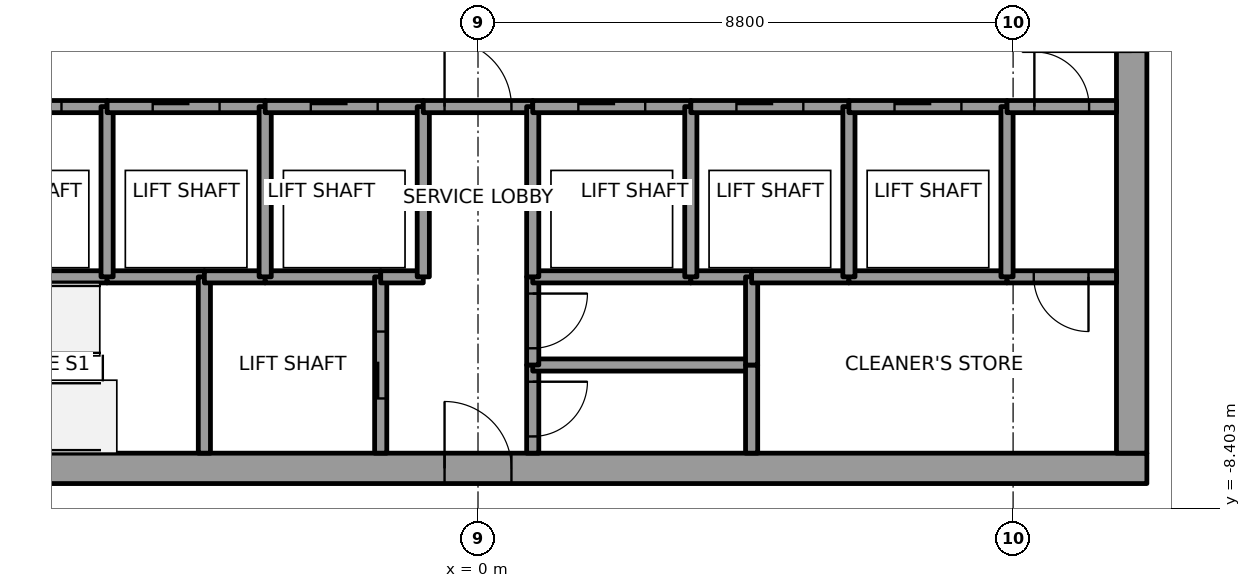
"""IFC4 building model, lengths in metres.
Left out: names, types, materials, properties, quantities, classifications, styles, units other than length and angle.
Written with IfcOpenShell. Run it as: python <this file> out.ifc"""

import sys

from ifc_helpers import new_model, si_unit, direction, frame, frame_2d, origin, place, context, subcontext, project, spatial, rectangle, extrude, element, fill, save


model = new_model("IFC4")
c1 = context("Model", 3, precision=1e-05, world=origin(), true_north=direction((0.0, 1.0)))
c2 = subcontext(c1, "Body", "Model", "MODEL_VIEW")
j1 = project(units=[si_unit("LENGTHUNIT", "METRE"), si_unit("PLANEANGLEUNIT", "RADIAN")], contexts=[c1])
p1 = place(None, origin())
s1 = spatial("IfcSite", under=j1, at=p1, CompositionType="ELEMENT")
p2 = place(p1, origin())
s2 = spatial("IfcBuilding", under=s1, at=p2, CompositionType="ELEMENT")
p3 = place(p2, frame((0.0, 0.0, 307.0)))
s3 = spatial("IfcBuildingStorey", under=s2, at=p3, CompositionType="ELEMENT", Elevation=307.0)
p4 = place(p3, frame((-11.0, -7.75, 0.0), z_axis=(0.0, 0.0, 1.0), x_axis=(1.0, 0.0, 0.0)))
e1 = element("IfcWall", 1, at=p4, inside=s3, PredefinedType="SHEAR", context=c2, shape_type="SweptSolid", body=[
    extrude(rectangle(XDim=22.0, YDim=0.5, at=frame_2d((11.0, 0.0))), origin(), (0.0, 0.0, 1.0), 4.0),
])
p5 = place(p4, frame((10.45, 0.0, 0.0)))
e2 = element("IfcOpeningElement", 2, at=p5, cuts=e1, PredefinedType="OPENING", context=c2, shape_type="SweptSolid", body=[
    extrude(rectangle(XDim=1.1, YDim=2.1, at=frame_2d((0.55, 1.05))), frame((0.0, 0.25, 0.0), z_axis=(0.0, -1.0, 0.0), x_axis=(1.0, 0.0, 0.0)), (0.0, 0.0, 1.0), 0.5),
])
p6 = place(p3, frame((10.75, -7.5, 0.0), z_axis=(0.0, 0.0, 1.0), x_axis=(0.0, 1.0, 0.0)))
e3 = element("IfcWall", 3, at=p6, inside=s3, PredefinedType="SHEAR", context=c2, shape_type="SweptSolid", body=[
    extrude(rectangle(XDim=15.0, YDim=0.5, at=frame_2d((7.5, 0.0))), origin(), (0.0, 0.0, 1.0), 4.0),
])
p7 = place(p6, frame((6.6, 0.0, 0.0)))
e4 = element("IfcOpeningElement", 4, at=p7, cuts=e3, PredefinedType="OPENING", context=c2, shape_type="SweptSolid", body=[
    extrude(rectangle(XDim=1.8, YDim=2.1, at=frame_2d((0.9, 1.05))), frame((0.0, 0.25, 0.0), z_axis=(0.0, -1.0, 0.0), x_axis=(1.0, 0.0, 0.0)), (0.0, 0.0, 1.0), 0.5),
])
p8 = place(p3, frame((-8.7, -4.6, 0.0), z_axis=(0.0, 0.0, 1.0), x_axis=(1.0, 0.0, 0.0)))
e5 = element("IfcWall", 5, at=p8, inside=s3, PredefinedType="SOLIDWALL", context=c2, shape_type="SweptSolid", body=[
    extrude(rectangle(XDim=2.6, YDim=0.2, at=frame_2d((1.3, 0.0))), origin(), (0.0, 0.0, 1.0), 3.85),
])
p9 = place(p3, frame((-8.7, -1.8, 0.0), z_axis=(0.0, 0.0, 1.0), x_axis=(1.0, 0.0, 0.0)))
e6 = element("IfcWall", 6, at=p9, inside=s3, PredefinedType="SOLIDWALL", context=c2, shape_type="SweptSolid", body=[
    extrude(rectangle(XDim=2.6, YDim=0.2, at=frame_2d((1.3, 0.0))), origin(), (0.0, 0.0, 1.0), 3.85),
])
p10 = place(p9, frame((0.75, 0.0, 0.0)))
e7 = element("IfcOpeningElement", 7, at=p10, cuts=e6, PredefinedType="OPENING", context=c2, shape_type="SweptSolid", body=[
    extrude(rectangle(XDim=1.1, YDim=2.1, at=frame_2d((0.55, 1.05))), frame((0.0, 0.1, 0.0), z_axis=(0.0, -1.0, 0.0), x_axis=(1.0, 0.0, 0.0)), (0.0, 0.0, 1.0), 0.2),
])
p11 = place(p3, frame((-6.1, -4.6, 0.0), z_axis=(0.0, 0.0, 1.0), x_axis=(1.0, 0.0, 0.0)))
e8 = element("IfcWall", 8, at=p11, inside=s3, PredefinedType="SOLIDWALL", context=c2, shape_type="SweptSolid", body=[
    extrude(rectangle(XDim=1.6, YDim=0.2, at=frame_2d((0.8, 0.0))), origin(), (0.0, 0.0, 1.0), 3.85),
])
p12 = place(p3, frame((-6.1, -4.6, 0.0), z_axis=(0.0, 0.0, 1.0), x_axis=(0.0, 1.0, 0.0)))
e9 = element("IfcWall", 9, at=p12, inside=s3, PredefinedType="SOLIDWALL", context=c2, shape_type="SweptSolid", body=[
    extrude(rectangle(XDim=2.8, YDim=0.2, at=frame_2d((1.4, 0.0))), origin(), (0.0, 0.0, 1.0), 3.85),
])
p13 = place(p3, frame((-6.1, -1.8, 0.0), z_axis=(0.0, 0.0, 1.0), x_axis=(1.0, 0.0, 0.0)))
e10 = element("IfcWall", 10, at=p13, inside=s3, PredefinedType="SOLIDWALL", context=c2, shape_type="SweptSolid", body=[
    extrude(rectangle(XDim=2.6, YDim=0.2, at=frame_2d((1.3, 0.0))), origin(), (0.0, 0.0, 1.0), 3.85),
])
p14 = place(p13, frame((0.75, 0.0, 0.0)))
e11 = element("IfcOpeningElement", 11, at=p14, cuts=e10, PredefinedType="OPENING", context=c2, shape_type="SweptSolid", body=[
    extrude(rectangle(XDim=1.1, YDim=2.1, at=frame_2d((0.55, 1.05))), frame((0.0, 0.1, 0.0), z_axis=(0.0, -1.0, 0.0), x_axis=(1.0, 0.0, 0.0)), (0.0, 0.0, 1.0), 0.2),
])
p15 = place(p3, frame((-4.5, -4.6, 0.0), z_axis=(0.0, 0.0, 1.0), x_axis=(0.0, -1.0, 0.0)))
e12 = element("IfcWall", 12, at=p15, inside=s3, PredefinedType="SOLIDWALL", context=c2, shape_type="SweptSolid", body=[
    extrude(rectangle(XDim=2.9, YDim=0.2, at=frame_2d((1.45, 0.0))), origin(), (0.0, 0.0, 1.0), 3.85),
])
p16 = place(p3, frame((-4.5, -4.6, 0.0), z_axis=(0.0, 0.0, 1.0), x_axis=(1.0, 0.0, 0.0)))
e13 = element("IfcWall", 13, at=p16, inside=s3, PredefinedType="SOLIDWALL", context=c2, shape_type="SweptSolid", body=[
    extrude(rectangle(XDim=1.0, YDim=0.2, at=frame_2d((0.5, 0.0))), origin(), (0.0, 0.0, 1.0), 3.85),
])
p17 = place(p3, frame((-3.5, -4.6, 0.0), z_axis=(0.0, 0.0, 1.0), x_axis=(1.0, 0.0, 0.0)))
e14 = element("IfcWall", 14, at=p17, inside=s3, PredefinedType="SOLIDWALL", context=c2, shape_type="SweptSolid", body=[
    extrude(rectangle(XDim=1.9, YDim=0.2, at=frame_2d((0.95, 0.0))), origin(), (0.0, 0.0, 1.0), 3.85),
])
p18 = place(p3, frame((-3.5, -4.6, 0.0), z_axis=(0.0, 0.0, 1.0), x_axis=(0.0, 1.0, 0.0)))
e15 = element("IfcWall", 15, at=p18, inside=s3, PredefinedType="SOLIDWALL", context=c2, shape_type="SweptSolid", body=[
    extrude(rectangle(XDim=2.8, YDim=0.2, at=frame_2d((1.4, 0.0))), origin(), (0.0, 0.0, 1.0), 3.85),
])
p19 = place(p3, frame((-3.5, -1.8, 0.0), z_axis=(0.0, 0.0, 1.0), x_axis=(1.0, 0.0, 0.0)))
e16 = element("IfcWall", 16, at=p19, inside=s3, PredefinedType="SOLIDWALL", context=c2, shape_type="SweptSolid", body=[
    extrude(rectangle(XDim=2.6, YDim=0.2, at=frame_2d((1.3, 0.0))), origin(), (0.0, 0.0, 1.0), 3.85),
])
p20 = place(p19, frame((0.75, 0.0, 0.0)))
e17 = element("IfcOpeningElement", 17, at=p20, cuts=e16, PredefinedType="OPENING", context=c2, shape_type="SweptSolid", body=[
    extrude(rectangle(XDim=1.1, YDim=2.1, at=frame_2d((0.55, 1.05))), frame((0.0, 0.1, 0.0), z_axis=(0.0, -1.0, 0.0), x_axis=(1.0, 0.0, 0.0)), (0.0, 0.0, 1.0), 0.2),
])
p21 = place(p3, frame((-1.6, -7.5, 0.0), z_axis=(0.0, 0.0, 1.0), x_axis=(0.0, 1.0, 0.0)))
e18 = element("IfcWall", 18, at=p21, inside=s3, PredefinedType="SOLIDWALL", context=c2, shape_type="SweptSolid", body=[
    extrude(rectangle(XDim=2.9, YDim=0.2, at=frame_2d((1.45, 0.0))), origin(), (0.0, 0.0, 1.0), 3.85),
])
p22 = place(p21, frame((0.9, 0.0, 0.0)))
e19 = element("IfcOpeningElement", 19, at=p22, cuts=e18, PredefinedType="OPENING", context=c2, shape_type="SweptSolid", body=[
    extrude(rectangle(XDim=1.1, YDim=2.1, at=frame_2d((0.55, 1.05))), frame((0.0, 0.1, 0.0), z_axis=(0.0, -1.0, 0.0), x_axis=(1.0, 0.0, 0.0)), (0.0, 0.0, 1.0), 0.2),
])
p23 = place(p3, frame((-1.6, -4.6, 0.0), z_axis=(0.0, 0.0, 1.0), x_axis=(1.0, 0.0, 0.0)))
e20 = element("IfcWall", 20, at=p23, inside=s3, PredefinedType="SOLIDWALL", context=c2, shape_type="SweptSolid", body=[
    extrude(rectangle(XDim=0.7, YDim=0.2, at=frame_2d((0.35, 0.0))), origin(), (0.0, 0.0, 1.0), 3.85),
])
p24 = place(p3, frame((-0.9, -4.6, 0.0), z_axis=(0.0, 0.0, 1.0), x_axis=(0.0, 1.0, 0.0)))
e21 = element("IfcWall", 21, at=p24, inside=s3, PredefinedType="SOLIDWALL", context=c2, shape_type="SweptSolid", body=[
    extrude(rectangle(XDim=2.8, YDim=0.2, at=frame_2d((1.4, 0.0))), origin(), (0.0, 0.0, 1.0), 3.85),
])
p25 = place(p3, frame((-0.9, -1.8, 0.0), z_axis=(0.0, 0.0, 1.0), x_axis=(1.0, 0.0, 0.0)))
e22 = element("IfcWall", 22, at=p25, inside=s3, PredefinedType="SOLIDWALL", context=c2, shape_type="SweptSolid", body=[
    extrude(rectangle(XDim=1.8, YDim=0.2, at=frame_2d((0.9, 0.0))), origin(), (0.0, 0.0, 1.0), 3.85),
])
p26 = place(p25, frame((0.35, 0.0, 0.0)))
e23 = element("IfcOpeningElement", 23, at=p26, cuts=e22, PredefinedType="OPENING", context=c2, shape_type="SweptSolid", body=[
    extrude(rectangle(XDim=1.1, YDim=2.1, at=frame_2d((0.55, 1.05))), frame((0.0, 0.1, 0.0), z_axis=(0.0, -1.0, 0.0), x_axis=(1.0, 0.0, 0.0)), (0.0, 0.0, 1.0), 0.2),
])
p27 = place(p3, frame((0.9, -6.05, 0.0), z_axis=(0.0, 0.0, 1.0), x_axis=(0.0, -1.0, 0.0)))
e24 = element("IfcWall", 24, at=p27, inside=s3, PredefinedType="SOLIDWALL", context=c2, shape_type="SweptSolid", body=[
    extrude(rectangle(XDim=1.45, YDim=0.2, at=frame_2d((0.725, 0.0))), origin(), (0.0, 0.0, 1.0), 3.85),
])
p28 = place(p27, frame((0.275, 0.0, 0.0)))
e25 = element("IfcOpeningElement", 25, at=p28, cuts=e24, PredefinedType="OPENING", context=c2, shape_type="SweptSolid", body=[
    extrude(rectangle(XDim=0.9, YDim=2.1, at=frame_2d((0.45, 1.05))), frame((0.0, 0.1, 0.0), z_axis=(0.0, -1.0, 0.0), x_axis=(1.0, 0.0, 0.0)), (0.0, 0.0, 1.0), 0.2),
])
p29 = place(p3, frame((4.5, -6.05, 0.0), z_axis=(0.0, 0.0, 1.0), x_axis=(-1.0, 0.0, 0.0)))
e26 = element("IfcWall", 26, at=p29, inside=s3, PredefinedType="SOLIDWALL", context=c2, shape_type="SweptSolid", body=[
    extrude(rectangle(XDim=3.6, YDim=0.2, at=frame_2d((1.8, 0.0))), origin(), (0.0, 0.0, 1.0), 3.85),
])
p30 = place(p3, frame((0.9, -4.6, 0.0), z_axis=(0.0, 0.0, 1.0), x_axis=(0.0, -1.0, 0.0)))
e27 = element("IfcWall", 27, at=p30, inside=s3, PredefinedType="SOLIDWALL", context=c2, shape_type="SweptSolid", body=[
    extrude(rectangle(XDim=1.45, YDim=0.2, at=frame_2d((0.725, 0.0))), origin(), (0.0, 0.0, 1.0), 3.85),
])
p31 = place(p30, frame((0.275, 0.0, 0.0)))
e28 = element("IfcOpeningElement", 28, at=p31, cuts=e27, PredefinedType="OPENING", context=c2, shape_type="SweptSolid", body=[
    extrude(rectangle(XDim=0.9, YDim=2.1, at=frame_2d((0.45, 1.05))), frame((0.0, 0.1, 0.0), z_axis=(0.0, -1.0, 0.0), x_axis=(1.0, 0.0, 0.0)), (0.0, 0.0, 1.0), 0.2),
])
p32 = place(p3, frame((3.5, -4.6, 0.0), z_axis=(0.0, 0.0, 1.0), x_axis=(-1.0, 0.0, 0.0)))
e29 = element("IfcWall", 29, at=p32, inside=s3, PredefinedType="SOLIDWALL", context=c2, shape_type="SweptSolid", body=[
    extrude(rectangle(XDim=2.6, YDim=0.2, at=frame_2d((1.3, 0.0))), origin(), (0.0, 0.0, 1.0), 3.85),
])
p33 = place(p3, frame((0.9, -1.8, 0.0), z_axis=(0.0, 0.0, 1.0), x_axis=(0.0, -1.0, 0.0)))
e30 = element("IfcWall", 30, at=p33, inside=s3, PredefinedType="SOLIDWALL", context=c2, shape_type="SweptSolid", body=[
    extrude(rectangle(XDim=2.8, YDim=0.2, at=frame_2d((1.4, 0.0))), origin(), (0.0, 0.0, 1.0), 3.85),
])
p34 = place(p3, frame((0.9, -1.8, 0.0), z_axis=(0.0, 0.0, 1.0), x_axis=(1.0, 0.0, 0.0)))
e31 = element("IfcWall", 31, at=p34, inside=s3, PredefinedType="SOLIDWALL", context=c2, shape_type="SweptSolid", body=[
    extrude(rectangle(XDim=2.6, YDim=0.2, at=frame_2d((1.3, 0.0))), origin(), (0.0, 0.0, 1.0), 3.85),
])
p35 = place(p34, frame((0.75, 0.0, 0.0)))
e32 = element("IfcOpeningElement", 32, at=p35, cuts=e31, PredefinedType="OPENING", context=c2, shape_type="SweptSolid", body=[
    extrude(rectangle(XDim=1.1, YDim=2.1, at=frame_2d((0.55, 1.05))), frame((0.0, 0.1, 0.0), z_axis=(0.0, -1.0, 0.0), x_axis=(1.0, 0.0, 0.0)), (0.0, 0.0, 1.0), 0.2),
])
p36 = place(p3, frame((4.5, -4.6, 0.0), z_axis=(0.0, 0.0, 1.0), x_axis=(-1.0, 0.0, 0.0)))
e33 = element("IfcWall", 33, at=p36, inside=s3, PredefinedType="SOLIDWALL", context=c2, shape_type="SweptSolid", body=[
    extrude(rectangle(XDim=1.0, YDim=0.2, at=frame_2d((0.5, 0.0))), origin(), (0.0, 0.0, 1.0), 3.85),
])
p37 = place(p3, frame((3.5, -4.6, 0.0), z_axis=(0.0, 0.0, 1.0), x_axis=(0.0, 1.0, 0.0)))
e34 = element("IfcWall", 34, at=p37, inside=s3, PredefinedType="SOLIDWALL", context=c2, shape_type="SweptSolid", body=[
    extrude(rectangle(XDim=2.8, YDim=0.2, at=frame_2d((1.4, 0.0))), origin(), (0.0, 0.0, 1.0), 3.85),
])
p38 = place(p3, frame((3.5, -1.8, 0.0), z_axis=(0.0, 0.0, 1.0), x_axis=(1.0, 0.0, 0.0)))
e35 = element("IfcWall", 35, at=p38, inside=s3, PredefinedType="SOLIDWALL", context=c2, shape_type="SweptSolid", body=[
    extrude(rectangle(XDim=2.6, YDim=0.2, at=frame_2d((1.3, 0.0))), origin(), (0.0, 0.0, 1.0), 3.85),
])
p39 = place(p38, frame((0.75, 0.0, 0.0)))
e36 = element("IfcOpeningElement", 36, at=p39, cuts=e35, PredefinedType="OPENING", context=c2, shape_type="SweptSolid", body=[
    extrude(rectangle(XDim=1.1, YDim=2.1, at=frame_2d((0.55, 1.05))), frame((0.0, 0.1, 0.0), z_axis=(0.0, -1.0, 0.0), x_axis=(1.0, 0.0, 0.0)), (0.0, 0.0, 1.0), 0.2),
])
for number, where, z_axis, x_axis in (
    (37, (4.5, -6.05, 0.0), (0.0, 0.0, 1.0), (0.0, -1.0, 0.0)),
    (38, (4.5, -4.6, 0.0), (0.0, 0.0, 1.0), (0.0, -1.0, 0.0)),
):
    element("IfcWall", number, at=place(p3, frame(where, z_axis=z_axis, x_axis=x_axis)), inside=s3, PredefinedType="SOLIDWALL", context=c2, shape_type="SweptSolid", body=[
        extrude(rectangle(XDim=1.45, YDim=0.2, at=frame_2d((0.725, 0.0))), origin(), (0.0, 0.0, 1.0), 3.85),
    ])
p40 = place(p3, frame((6.1, -4.6, 0.0), z_axis=(0.0, 0.0, 1.0), x_axis=(-1.0, 0.0, 0.0)))
e39 = element("IfcWall", 39, at=p40, inside=s3, PredefinedType="SOLIDWALL", context=c2, shape_type="SweptSolid", body=[
    extrude(rectangle(XDim=1.6, YDim=0.2, at=frame_2d((0.8, 0.0))), origin(), (0.0, 0.0, 1.0), 3.85),
])
p41 = place(p3, frame((8.7, -4.6, 0.0), z_axis=(0.0, 0.0, 1.0), x_axis=(-1.0, 0.0, 0.0)))
e40 = element("IfcWall", 40, at=p41, inside=s3, PredefinedType="SOLIDWALL", context=c2, shape_type="SweptSolid", body=[
    extrude(rectangle(XDim=2.6, YDim=0.2, at=frame_2d((1.3, 0.0))), origin(), (0.0, 0.0, 1.0), 3.85),
])
p42 = place(p3, frame((6.1, -4.6, 0.0), z_axis=(0.0, 0.0, 1.0), x_axis=(0.0, 1.0, 0.0)))
e41 = element("IfcWall", 41, at=p42, inside=s3, PredefinedType="SOLIDWALL", context=c2, shape_type="SweptSolid", body=[
    extrude(rectangle(XDim=2.8, YDim=0.2, at=frame_2d((1.4, 0.0))), origin(), (0.0, 0.0, 1.0), 3.85),
])
p43 = place(p3, frame((6.1, -1.8, 0.0), z_axis=(0.0, 0.0, 1.0), x_axis=(1.0, 0.0, 0.0)))
e42 = element("IfcWall", 42, at=p43, inside=s3, PredefinedType="SOLIDWALL", context=c2, shape_type="SweptSolid", body=[
    extrude(rectangle(XDim=2.6, YDim=0.2, at=frame_2d((1.3, 0.0))), origin(), (0.0, 0.0, 1.0), 3.85),
])
p44 = place(p43, frame((0.75, 0.0, 0.0)))
e43 = element("IfcOpeningElement", 43, at=p44, cuts=e42, PredefinedType="OPENING", context=c2, shape_type="SweptSolid", body=[
    extrude(rectangle(XDim=1.1, YDim=2.1, at=frame_2d((0.55, 1.05))), frame((0.0, 0.1, 0.0), z_axis=(0.0, -1.0, 0.0), x_axis=(1.0, 0.0, 0.0)), (0.0, 0.0, 1.0), 0.2),
])
p45 = place(p3, frame((10.5, -4.6, 0.0), z_axis=(0.0, 0.0, 1.0), x_axis=(-1.0, 0.0, 0.0)))
e44 = element("IfcWall", 44, at=p45, inside=s3, PredefinedType="SOLIDWALL", context=c2, shape_type="SweptSolid", body=[
    extrude(rectangle(XDim=1.8, YDim=0.2, at=frame_2d((0.9, 0.0))), origin(), (0.0, 0.0, 1.0), 3.85),
])
p46 = place(p45, frame((0.46, 0.0, 0.0)))
e45 = element("IfcOpeningElement", 45, at=p46, cuts=e44, PredefinedType="OPENING", context=c2, shape_type="SweptSolid", body=[
    extrude(rectangle(XDim=0.9, YDim=2.1, at=frame_2d((0.45, 1.05))), frame((0.0, 0.1, 0.0), z_axis=(0.0, -1.0, 0.0), x_axis=(1.0, 0.0, 0.0)), (0.0, 0.0, 1.0), 0.2),
])
p47 = place(p3, frame((8.7, -1.8, 0.0), z_axis=(0.0, 0.0, 1.0), x_axis=(0.0, -1.0, 0.0)))
e46 = element("IfcWall", 46, at=p47, inside=s3, PredefinedType="SOLIDWALL", context=c2, shape_type="SweptSolid", body=[
    extrude(rectangle(XDim=2.8, YDim=0.2, at=frame_2d((1.4, 0.0))), origin(), (0.0, 0.0, 1.0), 3.85),
])
p48 = place(p3, frame((8.7, -1.8, 0.0), z_axis=(0.0, 0.0, 1.0), x_axis=(1.0, 0.0, 0.0)))
e47 = element("IfcWall", 47, at=p48, inside=s3, PredefinedType="SOLIDWALL", context=c2, shape_type="SweptSolid", body=[
    extrude(rectangle(XDim=1.8, YDim=0.2, at=frame_2d((0.9, 0.0))), origin(), (0.0, 0.0, 1.0), 3.85),
])
p49 = place(p48, frame((0.45, 0.0, 0.0)))
e48 = element("IfcOpeningElement", 48, at=p49, cuts=e47, PredefinedType="OPENING", context=c2, shape_type="SweptSolid", body=[
    extrude(rectangle(XDim=0.9, YDim=2.1, at=frame_2d((0.45, 1.05))), frame((0.0, 0.1, 0.0), z_axis=(0.0, -1.0, 0.0), x_axis=(1.0, 0.0, 0.0)), (0.0, 0.0, 1.0), 0.2),
])
p50 = place(p10, origin())
e49 = element("IfcDoor", 49, at=p50, inside=s3, OperationType="SLIDING_TO_RIGHT", PredefinedType="DOOR", context=c2, shape_type="SweptSolid", body=[
    extrude(rectangle(XDim=1.1, YDim=2.1, at=frame_2d((0.55, 1.05))), frame((0.0, 0.025, 0.0), z_axis=(0.0, -1.0, 0.0), x_axis=(1.0, 0.0, 0.0)), (0.0, 0.0, 1.0), 0.05),
])
fill(e7, e49)
p51 = place(p14, origin())
e50 = element("IfcDoor", 50, at=p51, inside=s3, OperationType="SLIDING_TO_LEFT", PredefinedType="DOOR", context=c2, shape_type="SweptSolid", body=[
    extrude(rectangle(XDim=1.1, YDim=2.1, at=frame_2d((0.55, 1.05))), frame((0.0, 0.025, 0.0), z_axis=(0.0, -1.0, 0.0), x_axis=(1.0, 0.0, 0.0)), (0.0, 0.0, 1.0), 0.05),
])
fill(e11, e50)
p52 = place(p20, origin())
e51 = element("IfcDoor", 51, at=p52, inside=s3, OperationType="SLIDING_TO_RIGHT", PredefinedType="DOOR", context=c2, shape_type="SweptSolid", body=[
    extrude(rectangle(XDim=1.1, YDim=2.1, at=frame_2d((0.55, 1.05))), frame((0.0, 0.025, 0.0), z_axis=(0.0, -1.0, 0.0), x_axis=(1.0, 0.0, 0.0)), (0.0, 0.0, 1.0), 0.05),
])
fill(e17, e51)
p53 = place(p35, origin())
e52 = element("IfcDoor", 52, at=p53, inside=s3, OperationType="SLIDING_TO_LEFT", PredefinedType="DOOR", context=c2, shape_type="SweptSolid", body=[
    extrude(rectangle(XDim=1.1, YDim=2.1, at=frame_2d((0.55, 1.05))), frame((0.0, 0.025, 0.0), z_axis=(0.0, -1.0, 0.0), x_axis=(1.0, 0.0, 0.0)), (0.0, 0.0, 1.0), 0.05),
])
fill(e32, e52)
p54 = place(p39, origin())
e53 = element("IfcDoor", 53, at=p54, inside=s3, OperationType="SLIDING_TO_RIGHT", PredefinedType="DOOR", context=c2, shape_type="SweptSolid", body=[
    extrude(rectangle(XDim=1.1, YDim=2.1, at=frame_2d((0.55, 1.05))), frame((0.0, 0.025, 0.0), z_axis=(0.0, -1.0, 0.0), x_axis=(1.0, 0.0, 0.0)), (0.0, 0.0, 1.0), 0.05),
])
fill(e36, e53)
p55 = place(p44, origin())
e54 = element("IfcDoor", 54, at=p55, inside=s3, OperationType="SLIDING_TO_RIGHT", PredefinedType="DOOR", context=c2, shape_type="SweptSolid", body=[
    extrude(rectangle(XDim=1.1, YDim=2.1, at=frame_2d((0.55, 1.05))), frame((0.0, 0.025, 0.0), z_axis=(0.0, -1.0, 0.0), x_axis=(1.0, 0.0, 0.0)), (0.0, 0.0, 1.0), 0.05),
])
fill(e43, e54)
p56 = place(p22, origin())
e55 = element("IfcDoor", 55, at=p56, inside=s3, OperationType="SLIDING_TO_RIGHT", PredefinedType="DOOR", context=c2, shape_type="SweptSolid", body=[
    extrude(rectangle(XDim=1.1, YDim=2.1, at=frame_2d((0.55, 1.05))), frame((0.0, 0.025, 0.0), z_axis=(0.0, -1.0, 0.0), x_axis=(1.0, 0.0, 0.0)), (0.0, 0.0, 1.0), 0.05),
])
fill(e19, e55)
p57 = place(p26, origin())
e56 = element("IfcDoor", 56, at=p57, inside=s3, OperationType="SINGLE_SWING_RIGHT", PredefinedType="DOOR", context=c2, shape_type="SweptSolid", body=[
    extrude(rectangle(XDim=1.1, YDim=2.1, at=frame_2d((0.55, 1.05))), frame((0.0, 0.025, 0.0), z_axis=(0.0, -1.0, 0.0), x_axis=(1.0, 0.0, 0.0)), (0.0, 0.0, 1.0), 0.05),
])
fill(e23, e56)
p58 = place(p46, origin())
e57 = element("IfcDoor", 57, at=p58, inside=s3, OperationType="SINGLE_SWING_RIGHT", PredefinedType="DOOR", context=c2, shape_type="SweptSolid", body=[
    extrude(rectangle(XDim=0.9, YDim=2.1, at=frame_2d((0.45, 1.05))), frame((0.0, 0.025, 0.0), z_axis=(0.0, -1.0, 0.0), x_axis=(1.0, 0.0, 0.0)), (0.0, 0.0, 1.0), 0.05),
])
fill(e45, e57)
p59 = place(p49, origin())
e58 = element("IfcDoor", 58, at=p59, inside=s3, OperationType="SINGLE_SWING_LEFT", PredefinedType="DOOR", context=c2, shape_type="SweptSolid", body=[
    extrude(rectangle(XDim=0.9, YDim=2.1, at=frame_2d((0.45, 1.05))), frame((0.0, 0.025, 0.0), z_axis=(0.0, -1.0, 0.0), x_axis=(1.0, 0.0, 0.0)), (0.0, 0.0, 1.0), 0.05),
])
fill(e48, e58)
p60 = place(p28, origin())
e59 = element("IfcDoor", 59, at=p60, inside=s3, OperationType="SINGLE_SWING_LEFT", PredefinedType="DOOR", context=c2, shape_type="SweptSolid", body=[
    extrude(rectangle(XDim=0.9, YDim=2.1, at=frame_2d((0.45, 1.05))), frame((0.0, 0.025, 0.0), z_axis=(0.0, -1.0, 0.0), x_axis=(1.0, 0.0, 0.0)), (0.0, 0.0, 1.0), 0.05),
])
fill(e25, e59)
p61 = place(p31, origin())
e60 = element("IfcDoor", 60, at=p61, inside=s3, OperationType="SINGLE_SWING_RIGHT", PredefinedType="DOOR", context=c2, shape_type="SweptSolid", body=[
    extrude(rectangle(XDim=0.9, YDim=2.1, at=frame_2d((0.45, 1.05))), frame((0.0, 0.025, 0.0), z_axis=(0.0, -1.0, 0.0), x_axis=(1.0, 0.0, 0.0)), (0.0, 0.0, 1.0), 0.05),
])
fill(e28, e60)
p62 = place(p7, origin())
e61 = element("IfcDoor", 61, at=p62, inside=s3, OperationType="DOUBLE_DOOR_SINGLE_SWING", PredefinedType="DOOR", context=c2, shape_type="SweptSolid", body=[
    extrude(rectangle(XDim=1.8, YDim=2.1, at=frame_2d((0.9, 1.05))), frame((0.0, 0.025, 0.0), z_axis=(0.0, -1.0, 0.0), x_axis=(1.0, 0.0, 0.0)), (0.0, 0.0, 1.0), 0.05),
])
fill(e4, e61)
p63 = place(p5, origin())
e62 = element("IfcDoor", 62, at=p63, inside=s3, OperationType="SINGLE_SWING_LEFT", PredefinedType="DOOR", context=c2, shape_type="SweptSolid", body=[
    extrude(rectangle(XDim=1.1, YDim=2.1, at=frame_2d((0.55, 1.05))), frame((0.0, 0.025, 0.0), z_axis=(0.0, -1.0, 0.0), x_axis=(1.0, 0.0, 0.0)), (0.0, 0.0, 1.0), 0.05),
])
fill(e2, e62)
save(model, sys.argv[1])
